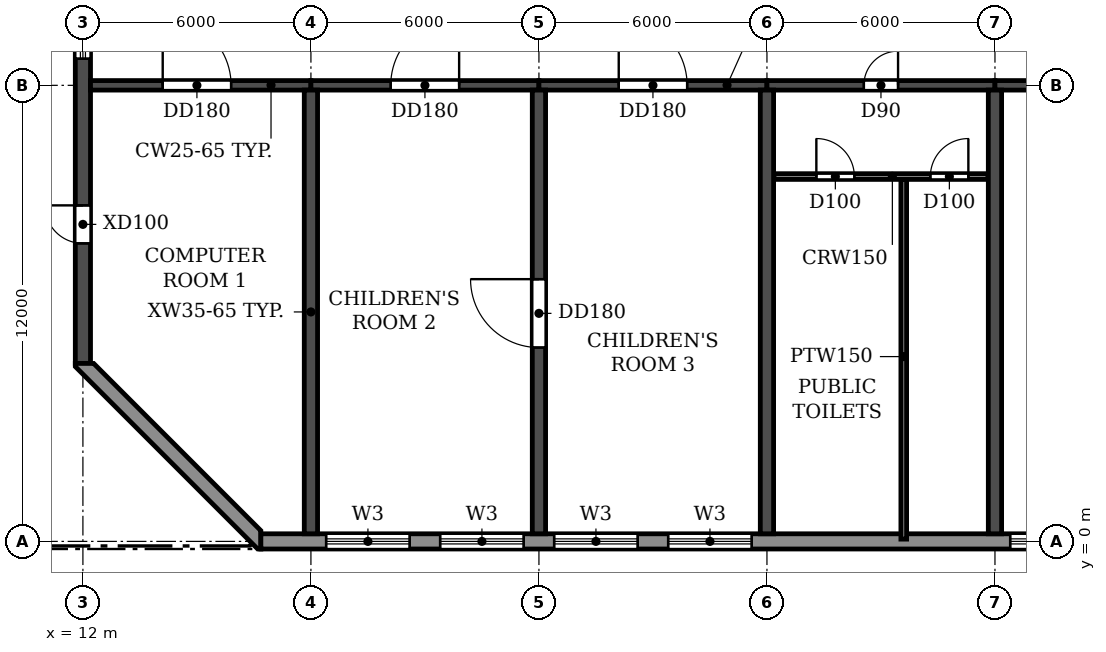
"""IFC4 building model, lengths in metres.
Left out: names, types, materials, properties, quantities, classifications, styles, units other than length and angle.
Written with IfcOpenShell. Run it as: python <this file> out.ifc"""

import sys

from ifc_helpers import new_model, si_unit, direction, frame, frame_2d, origin, place, context, subcontext, project, spatial, polyline, rectangle, outline, extrude, element, fill, save


model = new_model("IFC4")
c1 = context("Model", 3, precision=1e-05, world=origin(), true_north=direction((0.0, 1.0)))
c2 = subcontext(c1, "Body", "Model", "MODEL_VIEW")
j1 = project(units=[si_unit("LENGTHUNIT", "METRE"), si_unit("PLANEANGLEUNIT", "RADIAN")], contexts=[c1])
p1 = place(None, origin())
s1 = spatial("IfcSite", under=j1, at=p1, CompositionType="ELEMENT")
p2 = place(p1, origin())
s2 = spatial("IfcBuilding", under=s1, at=p2, CompositionType="ELEMENT")
p3 = place(p2, frame((0.0, 0.0, 105.9)))
s3 = spatial("IfcBuildingStorey", under=s2, at=p3, CompositionType="ELEMENT", Elevation=105.9)
p4 = place(p3, frame((18.0, 0.2, 0.0), z_axis=(0.0, 0.0, 1.0), x_axis=(0.0, 1.0, 0.0)))
e1 = element("IfcWall", 1, at=p4, inside=s3, PredefinedType="SHEAR", context=c2, shape_type="SweptSolid", body=[
    extrude(rectangle(XDim=11.675, YDim=0.35, at=frame_2d((5.837, 0.0))), origin(), (0.0, 0.0, 1.0), 3.06),
])
p5 = place(p3, frame((24.0, 0.2, 0.0), z_axis=(0.0, 0.0, 1.0), x_axis=(0.0, 1.0, 0.0)))
e2 = element("IfcWall", 2, at=p5, inside=s3, PredefinedType="SHEAR", context=c2, shape_type="SweptSolid", body=[
    extrude(rectangle(XDim=11.675, YDim=0.35, at=frame_2d((5.837, 0.0))), origin(), (0.0, 0.0, 1.0), 3.06),
])
p6 = place(p5, frame((4.9, 0.0, 0.0)))
e3 = element("IfcOpeningElement", 3, at=p6, cuts=e2, PredefinedType="OPENING", context=c2, shape_type="SweptSolid", body=[
    extrude(rectangle(XDim=1.8, YDim=2.1, at=frame_2d((0.9, 1.05))), frame((0.0, 0.185, 0.0), z_axis=(0.0, -1.0, 0.0), x_axis=(1.0, 0.0, 0.0)), (0.0, 0.0, 1.0), 0.37),
])
for number, where, z_axis, x_axis in (
    (4, (30.0, 0.2, 0.0), (0.0, 0.0, 1.0), (0.0, 1.0, 0.0)),
    (5, (36.0, 0.2, 0.0), (0.0, 0.0, 1.0), (0.0, 1.0, 0.0)),
):
    element("IfcWall", number, at=place(p3, frame(where, z_axis=z_axis, x_axis=x_axis)), inside=s3, PredefinedType="SHEAR", context=c2, shape_type="SweptSolid", body=[
        extrude(rectangle(XDim=11.675, YDim=0.35, at=frame_2d((5.837, 0.0))), origin(), (0.0, 0.0, 1.0), 3.06),
    ])
p7 = place(p3, frame((12.0, 4.683, 0.0), z_axis=(0.0, 0.0, 1.0), x_axis=(0.0, 1.0, 0.0)))
e6 = element("IfcWall", 6, at=p7, inside=s3, PredefinedType="SHEAR", context=c2, shape_type="SweptSolid", body=[
    extrude(rectangle(XDim=34.234, YDim=0.4, at=frame_2d((17.117, 0.0))), origin(), (0.0, 0.0, 1.0), 3.06),
])
p8 = place(p7, frame((23.817, 0.0, 0.9)))
e7 = element("IfcOpeningElement", 7, at=p8, cuts=e6, PredefinedType="OPENING", context=c2, shape_type="SweptSolid", body=[
    extrude(rectangle(XDim=1.2, YDim=1.5, at=frame_2d((0.6, 0.75))), frame((0.0, 0.21, 0.0), z_axis=(0.0, -1.0, 0.0), x_axis=(1.0, 0.0, 0.0)), (0.0, 0.0, 1.0), 0.42),
])
p9 = place(p7, frame((8.017, 0.0, 0.9)))
e8 = element("IfcOpeningElement", 8, at=p9, cuts=e6, PredefinedType="OPENING", context=c2, shape_type="SweptSolid", body=[
    extrude(rectangle(XDim=1.2, YDim=1.5, at=frame_2d((0.6, 0.75))), frame((0.0, 0.21, 0.0), z_axis=(0.0, -1.0, 0.0), x_axis=(1.0, 0.0, 0.0)), (0.0, 0.0, 1.0), 0.42),
])
p10 = place(p7, frame((15.917, 0.0, 0.9)))
e9 = element("IfcOpeningElement", 9, at=p10, cuts=e6, PredefinedType="OPENING", context=c2, shape_type="SweptSolid", body=[
    extrude(rectangle(XDim=1.2, YDim=1.5, at=frame_2d((0.6, 0.75))), frame((0.0, 0.21, 0.0), z_axis=(0.0, -1.0, 0.0), x_axis=(1.0, 0.0, 0.0)), (0.0, 0.0, 1.0), 0.42),
])
p11 = place(p7, frame((26.417, 0.0, 0.0)))
e10 = element("IfcOpeningElement", 10, at=p11, cuts=e6, PredefinedType="OPENING", context=c2, shape_type="SweptSolid", body=[
    extrude(rectangle(XDim=1.0, YDim=2.1, at=frame_2d((0.5, 1.05))), frame((0.0, 0.21, 0.0), z_axis=(0.0, -1.0, 0.0), x_axis=(1.0, 0.0, 0.0)), (0.0, 0.0, 1.0), 0.42),
])
p12 = place(p7, frame((3.159, 0.0, 0.0)))
e11 = element("IfcOpeningElement", 11, at=p12, cuts=e6, PredefinedType="OPENING", context=c2, shape_type="SweptSolid", body=[
    extrude(rectangle(XDim=1.0, YDim=2.1, at=frame_2d((0.5, 1.05))), frame((0.0, 0.21, 0.0), z_axis=(0.0, -1.0, 0.0), x_axis=(1.0, 0.0, 0.0)), (0.0, 0.0, 1.0), 0.42),
])
p13 = place(p3, frame((12.2, 12.0, 0.0), z_axis=(0.0, 0.0, 1.0), x_axis=(1.0, 0.0, 0.0)))
e12 = element("IfcWall", 12, at=p13, inside=s3, PredefinedType="SHEAR", context=c2, shape_type="SweptSolid", body=[
    extrude(rectangle(XDim=5.8, YDim=0.25, at=frame_2d((2.9, 0.0))), origin(), (0.0, 0.0, 1.0), 2.46),
])
p14 = place(p13, frame((1.9, 0.0, 0.0)))
e13 = element("IfcOpeningElement", 13, at=p14, cuts=e12, PredefinedType="OPENING", context=c2, shape_type="SweptSolid", body=[
    extrude(rectangle(XDim=1.8, YDim=2.1, at=frame_2d((0.9, 1.05))), frame((0.0, 0.135, 0.0), z_axis=(0.0, -1.0, 0.0), x_axis=(1.0, 0.0, 0.0)), (0.0, 0.0, 1.0), 0.27),
])
p15 = place(p3, frame((18.0, 12.0, 0.0), z_axis=(0.0, 0.0, 1.0), x_axis=(1.0, 0.0, 0.0)))
e14 = element("IfcWall", 14, at=p15, inside=s3, PredefinedType="SHEAR", context=c2, shape_type="SweptSolid", body=[
    extrude(rectangle(XDim=6.0, YDim=0.25, at=frame_2d((3.0, 0.0))), origin(), (0.0, 0.0, 1.0), 2.46),
])
p16 = place(p15, frame((2.1, 0.0, 0.0)))
e15 = element("IfcOpeningElement", 15, at=p16, cuts=e14, PredefinedType="OPENING", context=c2, shape_type="SweptSolid", body=[
    extrude(rectangle(XDim=1.8, YDim=2.1, at=frame_2d((0.9, 1.05))), frame((0.0, 0.135, 0.0), z_axis=(0.0, -1.0, 0.0), x_axis=(1.0, 0.0, 0.0)), (0.0, 0.0, 1.0), 0.27),
])
p17 = place(p3, frame((24.0, 12.0, 0.0), z_axis=(0.0, 0.0, 1.0), x_axis=(1.0, 0.0, 0.0)))
e16 = element("IfcWall", 16, at=p17, inside=s3, PredefinedType="SHEAR", context=c2, shape_type="SweptSolid", body=[
    extrude(rectangle(XDim=6.0, YDim=0.25, at=frame_2d((3.0, 0.0))), origin(), (0.0, 0.0, 1.0), 2.46),
])
p18 = place(p17, frame((2.1, 0.0, 0.0)))
e17 = element("IfcOpeningElement", 17, at=p18, cuts=e16, PredefinedType="OPENING", context=c2, shape_type="SweptSolid", body=[
    extrude(rectangle(XDim=1.8, YDim=2.1, at=frame_2d((0.9, 1.05))), frame((0.0, 0.135, 0.0), z_axis=(0.0, -1.0, 0.0), x_axis=(1.0, 0.0, 0.0)), (0.0, 0.0, 1.0), 0.27),
])
p19 = place(p3, frame((30.0, 12.0, 0.0), z_axis=(0.0, 0.0, 1.0), x_axis=(1.0, 0.0, 0.0)))
e18 = element("IfcWall", 18, at=p19, inside=s3, PredefinedType="SHEAR", context=c2, shape_type="SweptSolid", body=[
    extrude(rectangle(XDim=6.0, YDim=0.25, at=frame_2d((3.0, 0.0))), origin(), (0.0, 0.0, 1.0), 2.46),
])
p20 = place(p19, frame((2.55, 0.0, 0.0)))
e19 = element("IfcOpeningElement", 19, at=p20, cuts=e18, PredefinedType="OPENING", context=c2, shape_type="SweptSolid", body=[
    extrude(rectangle(XDim=0.9, YDim=2.1, at=frame_2d((0.45, 1.05))), frame((0.0, 0.135, 0.0), z_axis=(0.0, -1.0, 0.0), x_axis=(1.0, 0.0, 0.0)), (0.0, 0.0, 1.0), 0.27),
])
p21 = place(p3, frame((36.0, 12.0, 0.0), z_axis=(0.0, 0.0, 1.0), x_axis=(1.0, 0.0, 0.0)))
e20 = element("IfcWall", 20, at=p21, inside=s3, PredefinedType="SHEAR", context=c2, shape_type="SweptSolid", body=[
    extrude(rectangle(XDim=6.0, YDim=0.25, at=frame_2d((3.0, 0.0))), origin(), (0.0, 0.0, 1.0), 2.46),
])
p22 = place(p21, frame((2.1, 0.0, 0.0)))
e21 = element("IfcOpeningElement", 21, at=p22, cuts=e20, PredefinedType="OPENING", context=c2, shape_type="SweptSolid", body=[
    extrude(rectangle(XDim=1.8, YDim=2.1, at=frame_2d((0.9, 1.05))), frame((0.0, 0.135, 0.0), z_axis=(0.0, -1.0, 0.0), x_axis=(1.0, 0.0, 0.0)), (0.0, 0.0, 1.0), 0.27),
])
p23 = place(p3, frame((16.683, 0.0, 0.0), z_axis=(0.0, 0.0, 1.0), x_axis=(1.0, 0.0, 0.0)))
e22 = element("IfcWall", 22, at=p23, inside=s3, PredefinedType="STANDARD", context=c2, shape_type="SweptSolid", body=[
    extrude(rectangle(XDim=68.634, YDim=0.4, at=frame_2d((34.317, 0.0))), origin(), (0.0, 0.0, 1.0), 3.06),
])
p24 = place(p23, frame((1.717, 0.0, 0.6)))
e23 = element("IfcOpeningElement", 23, at=p24, cuts=e22, PredefinedType="OPENING", context=c2, shape_type="SweptSolid", body=[
    extrude(rectangle(XDim=2.2, YDim=1.8, at=frame_2d((1.1, 0.9))), frame((0.0, 0.21, 0.0), z_axis=(0.0, -1.0, 0.0), x_axis=(1.0, 0.0, 0.0)), (0.0, 0.0, 1.0), 0.42),
])
p25 = place(p23, frame((4.717, 0.0, 0.6)))
e24 = element("IfcOpeningElement", 24, at=p25, cuts=e22, PredefinedType="OPENING", context=c2, shape_type="SweptSolid", body=[
    extrude(rectangle(XDim=2.2, YDim=1.8, at=frame_2d((1.1, 0.9))), frame((0.0, 0.21, 0.0), z_axis=(0.0, -1.0, 0.0), x_axis=(1.0, 0.0, 0.0)), (0.0, 0.0, 1.0), 0.42),
])
p26 = place(p23, frame((7.717, 0.0, 0.6)))
e25 = element("IfcOpeningElement", 25, at=p26, cuts=e22, PredefinedType="OPENING", context=c2, shape_type="SweptSolid", body=[
    extrude(rectangle(XDim=2.2, YDim=1.8, at=frame_2d((1.1, 0.9))), frame((0.0, 0.21, 0.0), z_axis=(0.0, -1.0, 0.0), x_axis=(1.0, 0.0, 0.0)), (0.0, 0.0, 1.0), 0.42),
])
p27 = place(p23, frame((10.717, 0.0, 0.6)))
e26 = element("IfcOpeningElement", 26, at=p27, cuts=e22, PredefinedType="OPENING", context=c2, shape_type="SweptSolid", body=[
    extrude(rectangle(XDim=2.2, YDim=1.8, at=frame_2d((1.1, 0.9))), frame((0.0, 0.21, 0.0), z_axis=(0.0, -1.0, 0.0), x_axis=(1.0, 0.0, 0.0)), (0.0, 0.0, 1.0), 0.42),
])
p28 = place(p23, frame((19.717, 0.0, 0.6)))
e27 = element("IfcOpeningElement", 27, at=p28, cuts=e22, PredefinedType="OPENING", context=c2, shape_type="SweptSolid", body=[
    extrude(rectangle(XDim=2.2, YDim=1.8, at=frame_2d((1.1, 0.9))), frame((0.0, 0.21, 0.0), z_axis=(0.0, -1.0, 0.0), x_axis=(1.0, 0.0, 0.0)), (0.0, 0.0, 1.0), 0.42),
])
p29 = place(p23, frame((22.717, 0.0, 0.6)))
e28 = element("IfcOpeningElement", 28, at=p29, cuts=e22, PredefinedType="OPENING", context=c2, shape_type="SweptSolid", body=[
    extrude(rectangle(XDim=2.2, YDim=1.8, at=frame_2d((1.1, 0.9))), frame((0.0, 0.21, 0.0), z_axis=(0.0, -1.0, 0.0), x_axis=(1.0, 0.0, 0.0)), (0.0, 0.0, 1.0), 0.42),
])
p30 = place(p23, frame((25.717, 0.0, 0.6)))
e29 = element("IfcOpeningElement", 29, at=p30, cuts=e22, PredefinedType="OPENING", context=c2, shape_type="SweptSolid", body=[
    extrude(rectangle(XDim=2.2, YDim=1.8, at=frame_2d((1.1, 0.9))), frame((0.0, 0.21, 0.0), z_axis=(0.0, -1.0, 0.0), x_axis=(1.0, 0.0, 0.0)), (0.0, 0.0, 1.0), 0.42),
])
p31 = place(p23, frame((28.717, 0.0, 0.6)))
e30 = element("IfcOpeningElement", 30, at=p31, cuts=e22, PredefinedType="OPENING", context=c2, shape_type="SweptSolid", body=[
    extrude(rectangle(XDim=2.2, YDim=1.8, at=frame_2d((1.1, 0.9))), frame((0.0, 0.21, 0.0), z_axis=(0.0, -1.0, 0.0), x_axis=(1.0, 0.0, 0.0)), (0.0, 0.0, 1.0), 0.42),
])
p32 = place(p23, frame((37.717, 0.0, 0.6)))
e31 = element("IfcOpeningElement", 31, at=p32, cuts=e22, PredefinedType="OPENING", context=c2, shape_type="SweptSolid", body=[
    extrude(rectangle(XDim=2.2, YDim=1.8, at=frame_2d((1.1, 0.9))), frame((0.0, 0.21, 0.0), z_axis=(0.0, -1.0, 0.0), x_axis=(1.0, 0.0, 0.0)), (0.0, 0.0, 1.0), 0.42),
])
p33 = place(p23, frame((40.717, 0.0, 0.6)))
e32 = element("IfcOpeningElement", 32, at=p33, cuts=e22, PredefinedType="OPENING", context=c2, shape_type="SweptSolid", body=[
    extrude(rectangle(XDim=2.2, YDim=1.8, at=frame_2d((1.1, 0.9))), frame((0.0, 0.21, 0.0), z_axis=(0.0, -1.0, 0.0), x_axis=(1.0, 0.0, 0.0)), (0.0, 0.0, 1.0), 0.42),
])
p34 = place(p23, frame((43.717, 0.0, 0.6)))
e33 = element("IfcOpeningElement", 33, at=p34, cuts=e22, PredefinedType="OPENING", context=c2, shape_type="SweptSolid", body=[
    extrude(rectangle(XDim=2.2, YDim=1.8, at=frame_2d((1.1, 0.9))), frame((0.0, 0.21, 0.0), z_axis=(0.0, -1.0, 0.0), x_axis=(1.0, 0.0, 0.0)), (0.0, 0.0, 1.0), 0.42),
])
p35 = place(p23, frame((46.717, 0.0, 0.6)))
e34 = element("IfcOpeningElement", 34, at=p35, cuts=e22, PredefinedType="OPENING", context=c2, shape_type="SweptSolid", body=[
    extrude(rectangle(XDim=2.2, YDim=1.8, at=frame_2d((1.1, 0.9))), frame((0.0, 0.21, 0.0), z_axis=(0.0, -1.0, 0.0), x_axis=(1.0, 0.0, 0.0)), (0.0, 0.0, 1.0), 0.42),
])
p36 = place(p23, frame((49.717, 0.0, 0.6)))
e35 = element("IfcOpeningElement", 35, at=p36, cuts=e22, PredefinedType="OPENING", context=c2, shape_type="SweptSolid", body=[
    extrude(rectangle(XDim=2.2, YDim=1.8, at=frame_2d((1.1, 0.9))), frame((0.0, 0.21, 0.0), z_axis=(0.0, -1.0, 0.0), x_axis=(1.0, 0.0, 0.0)), (0.0, 0.0, 1.0), 0.42),
])
p37 = place(p23, frame((52.717, 0.0, 0.6)))
e36 = element("IfcOpeningElement", 36, at=p37, cuts=e22, PredefinedType="OPENING", context=c2, shape_type="SweptSolid", body=[
    extrude(rectangle(XDim=2.2, YDim=1.8, at=frame_2d((1.1, 0.9))), frame((0.0, 0.21, 0.0), z_axis=(0.0, -1.0, 0.0), x_axis=(1.0, 0.0, 0.0)), (0.0, 0.0, 1.0), 0.42),
])
p38 = place(p23, frame((55.717, 0.0, 0.6)))
e37 = element("IfcOpeningElement", 37, at=p38, cuts=e22, PredefinedType="OPENING", context=c2, shape_type="SweptSolid", body=[
    extrude(rectangle(XDim=2.2, YDim=1.8, at=frame_2d((1.1, 0.9))), frame((0.0, 0.21, 0.0), z_axis=(0.0, -1.0, 0.0), x_axis=(1.0, 0.0, 0.0)), (0.0, 0.0, 1.0), 0.42),
])
p39 = place(p23, frame((58.717, 0.0, 0.6)))
e38 = element("IfcOpeningElement", 38, at=p39, cuts=e22, PredefinedType="OPENING", context=c2, shape_type="SweptSolid", body=[
    extrude(rectangle(XDim=2.2, YDim=1.8, at=frame_2d((1.1, 0.9))), frame((0.0, 0.21, 0.0), z_axis=(0.0, -1.0, 0.0), x_axis=(1.0, 0.0, 0.0)), (0.0, 0.0, 1.0), 0.42),
])
p40 = place(p23, frame((61.717, 0.0, 0.6)))
e39 = element("IfcOpeningElement", 39, at=p40, cuts=e22, PredefinedType="OPENING", context=c2, shape_type="SweptSolid", body=[
    extrude(rectangle(XDim=2.2, YDim=1.8, at=frame_2d((1.1, 0.9))), frame((0.0, 0.21, 0.0), z_axis=(0.0, -1.0, 0.0), x_axis=(1.0, 0.0, 0.0)), (0.0, 0.0, 1.0), 0.42),
])
p41 = place(p23, frame((64.717, 0.0, 0.6)))
e40 = element("IfcOpeningElement", 40, at=p41, cuts=e22, PredefinedType="OPENING", context=c2, shape_type="SweptSolid", body=[
    extrude(rectangle(XDim=2.2, YDim=1.8, at=frame_2d((1.1, 0.9))), frame((0.0, 0.21, 0.0), z_axis=(0.0, -1.0, 0.0), x_axis=(1.0, 0.0, 0.0)), (0.0, 0.0, 1.0), 0.42),
])
p42 = place(p3, origin())
e41 = element("IfcWall", 41, at=p42, inside=s3, PredefinedType="STANDARD", context=c2, shape_type="SweptSolid", body=[
    extrude(outline(polyline([(11.8, 4.683), (11.8, 4.6), (16.6, -0.2), (16.683, -0.2), (16.683, 0.283), (12.283, 4.683), (11.8, 4.683)])), origin(), (0.0, 0.0, 1.0), 3.06),
])
p43 = place(p3, frame((30.185, 9.6, 0.0), z_axis=(0.0, 0.0, 1.0), x_axis=(1.0, 0.0, 0.0)))
e42 = element("IfcWall", 42, at=p43, inside=s3, PredefinedType="PARTITIONING", context=c2, shape_type="SweptSolid", body=[
    extrude(rectangle(XDim=5.63, YDim=0.15, at=frame_2d((2.815, 0.0))), origin(), (0.0, 0.0, 1.0), 3.06),
])
p44 = place(p43, frame((1.115, 0.0, 0.0)))
e43 = element("IfcOpeningElement", 43, at=p44, cuts=e42, PredefinedType="OPENING", context=c2, shape_type="SweptSolid", body=[
    extrude(rectangle(XDim=1.0, YDim=2.1, at=frame_2d((0.5, 1.05))), frame((0.0, 0.085, 0.0), z_axis=(0.0, -1.0, 0.0), x_axis=(1.0, 0.0, 0.0)), (0.0, 0.0, 1.0), 0.17),
])
p45 = place(p43, frame((4.115, 0.0, 0.0)))
e44 = element("IfcOpeningElement", 44, at=p45, cuts=e42, PredefinedType="OPENING", context=c2, shape_type="SweptSolid", body=[
    extrude(rectangle(XDim=1.0, YDim=2.1, at=frame_2d((0.5, 1.05))), frame((0.0, 0.085, 0.0), z_axis=(0.0, -1.0, 0.0), x_axis=(1.0, 0.0, 0.0)), (0.0, 0.0, 1.0), 0.17),
])
p46 = place(p3, frame((33.6, 0.06, 0.0), z_axis=(0.0, 0.0, 1.0), x_axis=(0.0, 1.0, 0.0)))
e45 = element("IfcWall", 45, at=p46, inside=s3, PredefinedType="PARTITIONING", context=c2, shape_type="SweptSolid", body=[
    extrude(rectangle(XDim=9.465, YDim=0.15, at=frame_2d((4.732, 0.0))), origin(), (0.0, 0.0, 1.0), 3.06),
])
p47 = place(p24, origin())
e46 = element("IfcWindow", 46, at=p47, inside=s3, PartitioningType="DOUBLE_PANEL_HORIZONTAL", PredefinedType="WINDOW", context=c2, shape_type="SweptSolid", body=[
    extrude(rectangle(XDim=2.2, YDim=1.8, at=frame_2d((1.1, 0.9))), frame((0.0, 0.03, 0.0), z_axis=(0.0, -1.0, 0.0), x_axis=(1.0, 0.0, 0.0)), (0.0, 0.0, 1.0), 0.06),
])
fill(e23, e46)
p48 = place(p25, origin())
e47 = element("IfcWindow", 47, at=p48, inside=s3, PartitioningType="DOUBLE_PANEL_HORIZONTAL", PredefinedType="WINDOW", context=c2, shape_type="SweptSolid", body=[
    extrude(rectangle(XDim=2.2, YDim=1.8, at=frame_2d((1.1, 0.9))), frame((0.0, 0.03, 0.0), z_axis=(0.0, -1.0, 0.0), x_axis=(1.0, 0.0, 0.0)), (0.0, 0.0, 1.0), 0.06),
])
fill(e24, e47)
p49 = place(p26, origin())
e48 = element("IfcWindow", 48, at=p49, inside=s3, PartitioningType="DOUBLE_PANEL_HORIZONTAL", PredefinedType="WINDOW", context=c2, shape_type="SweptSolid", body=[
    extrude(rectangle(XDim=2.2, YDim=1.8, at=frame_2d((1.1, 0.9))), frame((0.0, 0.03, 0.0), z_axis=(0.0, -1.0, 0.0), x_axis=(1.0, 0.0, 0.0)), (0.0, 0.0, 1.0), 0.06),
])
fill(e25, e48)
p50 = place(p27, origin())
e49 = element("IfcWindow", 49, at=p50, inside=s3, PartitioningType="DOUBLE_PANEL_HORIZONTAL", PredefinedType="WINDOW", context=c2, shape_type="SweptSolid", body=[
    extrude(rectangle(XDim=2.2, YDim=1.8, at=frame_2d((1.1, 0.9))), frame((0.0, 0.03, 0.0), z_axis=(0.0, -1.0, 0.0), x_axis=(1.0, 0.0, 0.0)), (0.0, 0.0, 1.0), 0.06),
])
fill(e26, e49)
p51 = place(p28, origin())
e50 = element("IfcWindow", 50, at=p51, inside=s3, PartitioningType="DOUBLE_PANEL_HORIZONTAL", PredefinedType="WINDOW", context=c2, shape_type="SweptSolid", body=[
    extrude(rectangle(XDim=2.2, YDim=1.8, at=frame_2d((1.1, 0.9))), frame((0.0, 0.03, 0.0), z_axis=(0.0, -1.0, 0.0), x_axis=(1.0, 0.0, 0.0)), (0.0, 0.0, 1.0), 0.06),
])
fill(e27, e50)
p52 = place(p9, origin())
e51 = element("IfcWindow", 51, at=p52, inside=s3, PartitioningType="SINGLE_PANEL", PredefinedType="WINDOW", context=c2, shape_type="SweptSolid", body=[
    extrude(rectangle(XDim=1.2, YDim=1.5, at=frame_2d((0.6, 0.75))), frame((0.0, 0.03, 0.0), z_axis=(0.0, -1.0, 0.0), x_axis=(1.0, 0.0, 0.0)), (0.0, 0.0, 1.0), 0.06),
])
fill(e8, e51)
p53 = place(p14, origin())
e52 = element("IfcDoor", 52, at=p53, inside=s3, OperationType="DOUBLE_DOOR_SINGLE_SWING", PredefinedType="DOOR", context=c2, shape_type="SweptSolid", body=[
    extrude(rectangle(XDim=1.8, YDim=2.1, at=frame_2d((0.9, 1.05))), frame((0.0, 0.025, 0.0), z_axis=(0.0, -1.0, 0.0), x_axis=(1.0, 0.0, 0.0)), (0.0, 0.0, 1.0), 0.05),
])
fill(e13, e52)
p54 = place(p16, origin())
e53 = element("IfcDoor", 53, at=p54, inside=s3, OperationType="DOUBLE_DOOR_SINGLE_SWING", PredefinedType="DOOR", context=c2, shape_type="SweptSolid", body=[
    extrude(rectangle(XDim=1.8, YDim=2.1, at=frame_2d((0.9, 1.05))), frame((0.0, 0.025, 0.0), z_axis=(0.0, -1.0, 0.0), x_axis=(1.0, 0.0, 0.0)), (0.0, 0.0, 1.0), 0.05),
])
fill(e15, e53)
p55 = place(p18, origin())
e54 = element("IfcDoor", 54, at=p55, inside=s3, OperationType="DOUBLE_DOOR_SINGLE_SWING", PredefinedType="DOOR", context=c2, shape_type="SweptSolid", body=[
    extrude(rectangle(XDim=1.8, YDim=2.1, at=frame_2d((0.9, 1.05))), frame((0.0, 0.025, 0.0), z_axis=(0.0, -1.0, 0.0), x_axis=(1.0, 0.0, 0.0)), (0.0, 0.0, 1.0), 0.05),
])
fill(e17, e54)
p56 = place(p20, origin())
e55 = element("IfcDoor", 55, at=p56, inside=s3, OperationType="SINGLE_SWING_RIGHT", PredefinedType="DOOR", context=c2, shape_type="SweptSolid", body=[
    extrude(rectangle(XDim=0.9, YDim=2.1, at=frame_2d((0.45, 1.05))), frame((0.0, 0.025, 0.0), z_axis=(0.0, -1.0, 0.0), x_axis=(1.0, 0.0, 0.0)), (0.0, 0.0, 1.0), 0.05),
])
fill(e19, e55)
p57 = place(p12, origin())
e56 = element("IfcDoor", 56, at=p57, inside=s3, OperationType="SINGLE_SWING_RIGHT", PredefinedType="DOOR", context=c2, shape_type="SweptSolid", body=[
    extrude(rectangle(XDim=1.0, YDim=2.1, at=frame_2d((0.5, 1.05))), frame((0.0, 0.025, 0.0), z_axis=(0.0, -1.0, 0.0), x_axis=(1.0, 0.0, 0.0)), (0.0, 0.0, 1.0), 0.05),
])
fill(e11, e56)
p58 = place(p6, origin())
e57 = element("IfcDoor", 57, at=p58, inside=s3, OperationType="DOUBLE_DOOR_SINGLE_SWING", PredefinedType="DOOR", context=c2, shape_type="SweptSolid", body=[
    extrude(rectangle(XDim=1.8, YDim=2.1, at=frame_2d((0.9, 1.05))), frame((0.0, 0.025, 0.0), z_axis=(0.0, -1.0, 0.0), x_axis=(1.0, 0.0, 0.0)), (0.0, 0.0, 1.0), 0.05),
])
fill(e3, e57)
p59 = place(p44, origin())
e58 = element("IfcDoor", 58, at=p59, inside=s3, OperationType="SINGLE_SWING_LEFT", PredefinedType="DOOR", context=c2, shape_type="SweptSolid", body=[
    extrude(rectangle(XDim=1.0, YDim=2.1, at=frame_2d((0.5, 1.05))), frame((0.0, 0.025, 0.0), z_axis=(0.0, -1.0, 0.0), x_axis=(1.0, 0.0, 0.0)), (0.0, 0.0, 1.0), 0.05),
])
fill(e43, e58)
p60 = place(p45, origin())
e59 = element("IfcDoor", 59, at=p60, inside=s3, OperationType="SINGLE_SWING_RIGHT", PredefinedType="DOOR", context=c2, shape_type="SweptSolid", body=[
    extrude(rectangle(XDim=1.0, YDim=2.1, at=frame_2d((0.5, 1.05))), frame((0.0, 0.025, 0.0), z_axis=(0.0, -1.0, 0.0), x_axis=(1.0, 0.0, 0.0)), (0.0, 0.0, 1.0), 0.05),
])
fill(e44, e59)
save(model, sys.argv[1])
